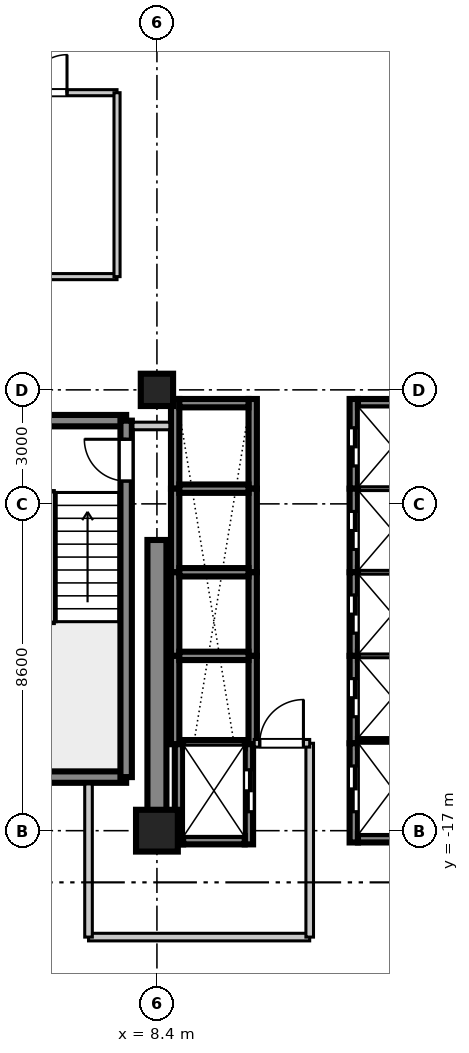
"""IFC4 building model, lengths in metres.
Left out: names, types, materials, properties, quantities, classifications, styles, units other than length and angle.
Written with IfcOpenShell. Run it as: python <this file> out.ifc"""

import sys

from ifc_helpers import new_model, si_unit, direction, frame, frame_2d, origin, origin_2d, place, context, subcontext, project, spatial, rectangle, extrude, source, transform, mapped, element, fill, save


model = new_model("IFC4")
c1 = context("Model", 3, precision=1e-05, world=origin(), true_north=direction((0.0, 1.0)))
c2 = subcontext(c1, "Body", "Model", "MODEL_VIEW")
j1 = project(units=[si_unit("LENGTHUNIT", "METRE"), si_unit("PLANEANGLEUNIT", "RADIAN")], contexts=[c1])
p1 = place(None, origin())
s1 = spatial("IfcSite", under=j1, at=p1, CompositionType="ELEMENT")
p2 = place(p1, origin())
s2 = spatial("IfcBuilding", under=s1, at=p2, CompositionType="ELEMENT")
p3 = place(p2, frame((0.0, 0.0, 156.3)))
s3 = spatial("IfcBuildingStorey", under=s2, at=p3, CompositionType="ELEMENT", Elevation=156.3)
m1 = source(origin(), c2, "Body", "SweptSolid", [
    extrude(rectangle(XDim=1.1, YDim=1.1, at=origin_2d()), origin(), (0.0, 0.0, 1.0), 3.605),
])
p4 = place(p3, frame((8.4, -17.0, 0.0), z_axis=(0.0, 0.0, 1.0), x_axis=(1.0, 0.0, 0.0)))
e1 = element("IfcColumn", 1, at=p4, inside=s3, PredefinedType="COLUMN", context=c2, shape_type="MappedRepresentation", body=[
    mapped(m1, transform((0.0, 0.0, 0.0), scale=1.0)),
])
m2 = source(origin(), c2, "Body", "SweptSolid", [
    extrude(rectangle(XDim=0.85, YDim=0.85, at=origin_2d()), origin(), (0.0, 0.0, 1.0), 3.605),
])
p5 = place(p3, frame((8.4, -5.4, 0.0), z_axis=(0.0, 0.0, 1.0), x_axis=(1.0, 0.0, 0.0)))
e2 = element("IfcColumn", 2, at=p5, inside=s3, PredefinedType="PILASTER", context=c2, shape_type="MappedRepresentation", body=[
    mapped(m2, transform((0.0, 0.0, 0.0), scale=1.0)),
])
m3 = source(origin(), c2, "Body", "SweptSolid", [
    extrude(rectangle(XDim=7.65, YDim=0.5, at=frame_2d((3.825, 0.0))), origin(), (0.0, 0.0, 1.0), 3.39),
])
p6 = place(p3, frame((8.4, -17.0, 0.0), z_axis=(0.0, 0.0, 1.0), x_axis=(0.0, 1.0, 0.0)))
e3 = element("IfcWall", 3, at=p6, inside=s3, PredefinedType="SHEAR", context=c2, shape_type="MappedRepresentation", body=[
    mapped(m3, transform((0.0, 0.0, 0.0), scale=1.0)),
])
m4 = source(origin(), c2, "Body", "SweptSolid", [
    extrude(rectangle(XDim=3.98, YDim=0.3, at=frame_2d((1.99, 0.0))), origin(), (0.0, 0.0, 1.0), 3.39),
])
for number, where, z_axis, x_axis in (
    (4, (3.61, -15.59, 0.0), (0.0, 0.0, 1.0), (1.0, 0.0, 0.0)),
    (5, (3.61, -6.21, 0.0), (0.0, 0.0, 1.0), (1.0, 0.0, 0.0)),
):
    element("IfcWall", number, at=place(p3, frame(where, z_axis=z_axis, x_axis=x_axis)), inside=s3, PredefinedType="SHEAR", context=c2, shape_type="MappedRepresentation", body=[
        mapped(m4, transform((0.0, 0.0, 0.0), scale=1.0)),
    ])
m5 = source(origin(), c2, "Body", "SweptSolid", [
    extrude(rectangle(XDim=9.38, YDim=0.3, at=frame_2d((4.69, 0.0))), origin(), (0.0, 0.0, 1.0), 3.39),
])
p7 = place(p3, frame((7.59, -15.59, 0.0), z_axis=(0.0, 0.0, 1.0), x_axis=(0.0, 1.0, 0.0)))
e6 = element("IfcWall", 6, at=p7, inside=s3, PredefinedType="SHEAR", context=c2, shape_type="MappedRepresentation", body=[
    mapped(m5, transform((0.0, 0.0, 0.0), scale=1.0)),
])
p8 = place(p7, frame((7.79, 0.0, 0.0)))
e7 = element("IfcOpeningElement", 7, at=p8, cuts=e6, PredefinedType="OPENING", context=c2, shape_type="SweptSolid", body=[
    extrude(rectangle(XDim=1.1, YDim=2.15, at=frame_2d((0.55, 1.075))), frame((0.0, 0.16, 0.0), z_axis=(0.0, -1.0, 0.0), x_axis=(1.0, 0.0, 0.0)), (0.0, 0.0, 1.0), 0.32),
])
m6 = source(origin(), c2, "Body", "SweptSolid", [
    extrude(rectangle(XDim=2.36, YDim=0.22, at=frame_2d((1.18, 0.0))), origin(), (0.0, 0.0, 1.0), 3.39),
])
p9 = place(p3, frame((13.58, -8.0, 0.0), z_axis=(0.0, 0.0, 1.0), x_axis=(0.0, 1.0, 0.0)))
e8 = element("IfcWall", 8, at=p9, inside=s3, PredefinedType="SHEAR", context=c2, shape_type="MappedRepresentation", body=[
    mapped(m6, transform((0.0, 0.0, 0.0), scale=1.0)),
])
p10 = place(p9, frame((0.6, 0.0, 0.0)))
e9 = element("IfcOpeningElement", 9, at=p10, cuts=e8, PredefinedType="OPENING", context=c2, shape_type="SweptSolid", body=[
    extrude(rectangle(XDim=1.0, YDim=2.2, at=frame_2d((0.5, 1.1))), frame((0.0, 0.12, 0.0), z_axis=(0.0, -1.0, 0.0), x_axis=(1.0, 0.0, 0.0)), (0.0, 0.0, 1.0), 0.24),
])
m7 = source(origin(), c2, "Body", "SweptSolid", [
    extrude(rectangle(XDim=1.82, YDim=0.22, at=frame_2d((0.91, 0.0))), origin(), (0.0, 0.0, 1.0), 3.39),
])
p11 = place(p3, frame((13.69, -5.75, 0.0), z_axis=(0.0, 0.0, 1.0), x_axis=(1.0, 0.0, 0.0)))
e10 = element("IfcWall", 10, at=p11, inside=s3, PredefinedType="SHEAR", context=c2, shape_type="MappedRepresentation", body=[
    mapped(m7, transform((0.0, 0.0, 0.0), scale=1.0)),
])
m8 = source(origin(), c2, "Body", "SweptSolid", [
    extrude(rectangle(XDim=2.2, YDim=0.22, at=frame_2d((1.1, 0.0))), origin(), (0.0, 0.0, 1.0), 3.39),
])
p12 = place(p3, frame((13.58, -10.2, 0.0), z_axis=(0.0, 0.0, 1.0), x_axis=(0.0, 1.0, 0.0)))
e11 = element("IfcWall", 11, at=p12, inside=s3, PredefinedType="SHEAR", context=c2, shape_type="MappedRepresentation", body=[
    mapped(m8, transform((0.0, 0.0, 0.0), scale=1.0)),
])
p13 = place(p12, frame((0.6, 0.0, 0.0)))
e12 = element("IfcOpeningElement", 12, at=p13, cuts=e11, PredefinedType="OPENING", context=c2, shape_type="SweptSolid", body=[
    extrude(rectangle(XDim=1.0, YDim=2.2, at=frame_2d((0.5, 1.1))), frame((0.0, 0.12, 0.0), z_axis=(0.0, -1.0, 0.0), x_axis=(1.0, 0.0, 0.0)), (0.0, 0.0, 1.0), 0.24),
])
m9 = source(origin(), c2, "Body", "SweptSolid", [
    extrude(rectangle(XDim=1.82, YDim=0.22, at=frame_2d((0.91, 0.0))), origin(), (0.0, 0.0, 1.0), 3.65),
])
p14 = place(p3, frame((13.69, -8.0, 0.0), z_axis=(0.0, 0.0, 1.0), x_axis=(1.0, 0.0, 0.0)))
e13 = element("IfcWall", 13, at=p14, inside=s3, PredefinedType="SHEAR", context=c2, shape_type="MappedRepresentation", body=[
    mapped(m9, transform((0.0, 0.0, 0.0), scale=1.0)),
])
p15 = place(p3, frame((13.58, -12.4, 0.0), z_axis=(0.0, 0.0, 1.0), x_axis=(0.0, 1.0, 0.0)))
e14 = element("IfcWall", 14, at=p15, inside=s3, PredefinedType="SHEAR", context=c2, shape_type="MappedRepresentation", body=[
    mapped(m8, transform((0.0, 0.0, 0.0), scale=1.0)),
])
p16 = place(p15, frame((0.6, 0.0, 0.0)))
e15 = element("IfcOpeningElement", 15, at=p16, cuts=e14, PredefinedType="OPENING", context=c2, shape_type="SweptSolid", body=[
    extrude(rectangle(XDim=1.0, YDim=2.2, at=frame_2d((0.5, 1.1))), frame((0.0, 0.12, 0.0), z_axis=(0.0, -1.0, 0.0), x_axis=(1.0, 0.0, 0.0)), (0.0, 0.0, 1.0), 0.24),
])
p17 = place(p3, frame((13.69, -10.2, 0.0), z_axis=(0.0, 0.0, 1.0), x_axis=(1.0, 0.0, 0.0)))
e16 = element("IfcWall", 16, at=p17, inside=s3, PredefinedType="SHEAR", context=c2, shape_type="MappedRepresentation", body=[
    mapped(m9, transform((0.0, 0.0, 0.0), scale=1.0)),
])
m10 = source(origin(), c2, "Body", "SweptSolid", [
    extrude(rectangle(XDim=2.3, YDim=0.22, at=frame_2d((1.15, 0.0))), origin(), (0.0, 0.0, 1.0), 3.39),
])
p18 = place(p3, frame((13.58, -14.7, 0.0), z_axis=(0.0, 0.0, 1.0), x_axis=(0.0, 1.0, 0.0)))
e17 = element("IfcWall", 17, at=p18, inside=s3, PredefinedType="SHEAR", context=c2, shape_type="MappedRepresentation", body=[
    mapped(m10, transform((0.0, 0.0, 0.0), scale=1.0)),
])
p19 = place(p18, frame((0.7, 0.0, 0.0)))
e18 = element("IfcOpeningElement", 18, at=p19, cuts=e17, PredefinedType="OPENING", context=c2, shape_type="SweptSolid", body=[
    extrude(rectangle(XDim=1.0, YDim=2.2, at=frame_2d((0.5, 1.1))), frame((0.0, 0.12, 0.0), z_axis=(0.0, -1.0, 0.0), x_axis=(1.0, 0.0, 0.0)), (0.0, 0.0, 1.0), 0.24),
])
p20 = place(p3, frame((13.69, -12.4, 0.0), z_axis=(0.0, 0.0, 1.0), x_axis=(1.0, 0.0, 0.0)))
e19 = element("IfcWall", 19, at=p20, inside=s3, PredefinedType="SHEAR", context=c2, shape_type="MappedRepresentation", body=[
    mapped(m9, transform((0.0, 0.0, 0.0), scale=1.0)),
])
for number, where, z_axis, x_axis in (
    (20, (8.88, -8.0, 0.0), (0.0, 0.0, 1.0), (0.0, 1.0, 0.0)),
    (21, (10.92, -8.0, 0.0), (0.0, 0.0, 1.0), (0.0, 1.0, 0.0)),
):
    element("IfcWall", number, at=place(p3, frame(where, z_axis=z_axis, x_axis=x_axis)), inside=s3, PredefinedType="SHEAR", context=c2, shape_type="MappedRepresentation", body=[
        mapped(m6, transform((0.0, 0.0, 0.0), scale=1.0)),
    ])
p21 = place(p3, frame((8.99, -5.75, 0.0), z_axis=(0.0, 0.0, 1.0), x_axis=(1.0, 0.0, 0.0)))
e22 = element("IfcWall", 22, at=p21, inside=s3, PredefinedType="SHEAR", context=c2, shape_type="MappedRepresentation", body=[
    mapped(m7, transform((0.0, 0.0, 0.0), scale=1.0)),
])
for number, where, z_axis, x_axis in (
    (23, (8.88, -10.2, 0.0), (0.0, 0.0, 1.0), (0.0, 1.0, 0.0)),
    (24, (10.92, -10.2, 0.0), (0.0, 0.0, 1.0), (0.0, 1.0, 0.0)),
):
    element("IfcWall", number, at=place(p3, frame(where, z_axis=z_axis, x_axis=x_axis)), inside=s3, PredefinedType="SHEAR", context=c2, shape_type="MappedRepresentation", body=[
        mapped(m8, transform((0.0, 0.0, 0.0), scale=1.0)),
    ])
p22 = place(p3, frame((8.99, -8.0, 0.0), z_axis=(0.0, 0.0, 1.0), x_axis=(1.0, 0.0, 0.0)))
e25 = element("IfcWall", 25, at=p22, inside=s3, PredefinedType="SHEAR", context=c2, shape_type="MappedRepresentation", body=[
    mapped(m9, transform((0.0, 0.0, 0.0), scale=1.0)),
])
for number, where, z_axis, x_axis in (
    (26, (8.88, -12.4, 0.0), (0.0, 0.0, 1.0), (0.0, 1.0, 0.0)),
    (27, (10.92, -12.4, 0.0), (0.0, 0.0, 1.0), (0.0, 1.0, 0.0)),
):
    element("IfcWall", number, at=place(p3, frame(where, z_axis=z_axis, x_axis=x_axis)), inside=s3, PredefinedType="SHEAR", context=c2, shape_type="MappedRepresentation", body=[
        mapped(m8, transform((0.0, 0.0, 0.0), scale=1.0)),
    ])
p23 = place(p3, frame((8.99, -10.2, 0.0), z_axis=(0.0, 0.0, 1.0), x_axis=(1.0, 0.0, 0.0)))
e28 = element("IfcWall", 28, at=p23, inside=s3, PredefinedType="SHEAR", context=c2, shape_type="MappedRepresentation", body=[
    mapped(m9, transform((0.0, 0.0, 0.0), scale=1.0)),
])
m11 = source(origin(), c2, "Body", "SweptSolid", [
    extrude(rectangle(XDim=2.325, YDim=0.22, at=frame_2d((1.163, 0.0))), origin(), (0.0, 0.0, 1.0), 3.39),
])
for number, where, z_axis, x_axis in (
    (29, (8.88, -14.725, 0.0), (0.0, 0.0, 1.0), (0.0, 1.0, 0.0)),
    (30, (10.92, -14.725, 0.0), (0.0, 0.0, 1.0), (0.0, 1.0, 0.0)),
):
    element("IfcWall", number, at=place(p3, frame(where, z_axis=z_axis, x_axis=x_axis)), inside=s3, PredefinedType="SHEAR", context=c2, shape_type="MappedRepresentation", body=[
        mapped(m11, transform((0.0, 0.0, 0.0), scale=1.0)),
    ])
p24 = place(p3, frame((8.99, -12.4, 0.0), z_axis=(0.0, 0.0, 1.0), x_axis=(1.0, 0.0, 0.0)))
e31 = element("IfcWall", 31, at=p24, inside=s3, PredefinedType="SHEAR", context=c2, shape_type="MappedRepresentation", body=[
    mapped(m9, transform((0.0, 0.0, 0.0), scale=1.0)),
])
m12 = source(origin(), c2, "Body", "SweptSolid", [
    extrude(rectangle(XDim=2.635, YDim=0.22, at=frame_2d((1.317, 0.0))), origin(), (0.0, 0.0, 1.0), 3.39),
])
p25 = place(p3, frame((8.98, -17.36, 0.0), z_axis=(0.0, 0.0, 1.0), x_axis=(0.0, 1.0, 0.0)))
e32 = element("IfcWall", 32, at=p25, inside=s3, PredefinedType="SHEAR", context=c2, shape_type="MappedRepresentation", body=[
    mapped(m12, transform((0.0, 0.0, 0.0), scale=1.0)),
])
p26 = place(p3, frame((10.82, -17.36, 0.0), z_axis=(0.0, 0.0, 1.0), x_axis=(0.0, 1.0, 0.0)))
e33 = element("IfcWall", 33, at=p26, inside=s3, PredefinedType="SHEAR", context=c2, shape_type="MappedRepresentation", body=[
    mapped(m12, transform((0.0, 0.0, 0.0), scale=1.0)),
])
p27 = place(p26, frame((0.86, 0.0, 0.0)))
e34 = element("IfcOpeningElement", 34, at=p27, cuts=e33, PredefinedType="OPENING", context=c2, shape_type="SweptSolid", body=[
    extrude(rectangle(XDim=1.1, YDim=2.2, at=frame_2d((0.55, 1.1))), frame((0.0, 0.12, 0.0), z_axis=(0.0, -1.0, 0.0), x_axis=(1.0, 0.0, 0.0)), (0.0, 0.0, 1.0), 0.24),
])
m13 = source(origin(), c2, "Body", "SweptSolid", [
    extrude(rectangle(XDim=1.62, YDim=0.22, at=frame_2d((0.81, 0.0))), origin(), (0.0, 0.0, 1.0), 3.39),
])
p28 = place(p3, frame((9.09, -17.25, 0.0), z_axis=(0.0, 0.0, 1.0), x_axis=(1.0, 0.0, 0.0)))
e35 = element("IfcWall", 35, at=p28, inside=s3, PredefinedType="SHEAR", context=c2, shape_type="MappedRepresentation", body=[
    mapped(m13, transform((0.0, 0.0, 0.0), scale=1.0)),
])
m14 = source(origin(), c2, "Body", "SweptSolid", [
    extrude(rectangle(XDim=1.62, YDim=0.22, at=frame_2d((0.81, 0.0))), origin(), (0.0, 0.0, 1.0), 3.65),
])
p29 = place(p3, frame((9.09, -14.725, 0.0), z_axis=(0.0, 0.0, 1.0), x_axis=(1.0, 0.0, 0.0)))
e36 = element("IfcWall", 36, at=p29, inside=s3, PredefinedType="SHEAR", context=c2, shape_type="MappedRepresentation", body=[
    mapped(m14, transform((0.0, 0.0, 0.0), scale=1.0)),
])
m15 = source(origin(), c2, "Body", "SweptSolid", [
    extrude(rectangle(XDim=2.61, YDim=0.22, at=frame_2d((1.305, 0.0))), origin(), (0.0, 0.0, 1.0), 3.39),
])
p30 = place(p3, frame((13.58, -17.31, 0.0), z_axis=(0.0, 0.0, 1.0), x_axis=(0.0, 1.0, 0.0)))
e37 = element("IfcWall", 37, at=p30, inside=s3, PredefinedType="SHEAR", context=c2, shape_type="MappedRepresentation", body=[
    mapped(m15, transform((0.0, 0.0, 0.0), scale=1.0)),
])
p31 = place(p30, frame((0.81, 0.0, 0.0)))
e38 = element("IfcOpeningElement", 38, at=p31, cuts=e37, PredefinedType="OPENING", context=c2, shape_type="SweptSolid", body=[
    extrude(rectangle(XDim=1.2, YDim=2.2, at=frame_2d((0.6, 1.1))), frame((0.0, 0.12, 0.0), z_axis=(0.0, -1.0, 0.0), x_axis=(1.0, 0.0, 0.0)), (0.0, 0.0, 1.0), 0.24),
])
p32 = place(p3, frame((13.69, -17.2, 0.0), z_axis=(0.0, 0.0, 1.0), x_axis=(1.0, 0.0, 0.0)))
e39 = element("IfcWall", 39, at=p32, inside=s3, PredefinedType="SHEAR", context=c2, shape_type="MappedRepresentation", body=[
    mapped(m7, transform((0.0, 0.0, 0.0), scale=1.0)),
])
p33 = place(p3, frame((13.69, -14.7, 0.0), z_axis=(0.0, 0.0, 1.0), x_axis=(1.0, 0.0, 0.0)))
e40 = element("IfcWall", 40, at=p33, inside=s3, PredefinedType="SHEAR", context=c2, shape_type="MappedRepresentation", body=[
    mapped(m9, transform((0.0, 0.0, 0.0), scale=1.0)),
])
m16 = source(origin(), c2, "Body", "SweptSolid", [
    extrude(rectangle(XDim=5.82, YDim=0.2, at=frame_2d((2.91, 0.0))), origin(), (0.0, 0.0, 1.0), 2.73),
])
p34 = place(p3, frame((6.6, -19.8, 0.0), z_axis=(0.0, 0.0, 1.0), x_axis=(1.0, 0.0, 0.0)))
e41 = element("IfcWall", 41, at=p34, inside=s3, PredefinedType="PARTITIONING", context=c2, shape_type="MappedRepresentation", body=[
    mapped(m16, transform((0.0, 0.0, 0.0), scale=1.0)),
])
m17 = source(origin(), c2, "Body", "SweptSolid", [
    extrude(rectangle(XDim=4.03, YDim=0.2, at=frame_2d((2.015, 0.0))), origin(), (0.0, 0.0, 1.0), 2.73),
])
p35 = place(p3, frame((6.6, -19.8, 0.0), z_axis=(0.0, 0.0, 1.0), x_axis=(0.0, 1.0, 0.0)))
e42 = element("IfcWall", 42, at=p35, inside=s3, PredefinedType="PARTITIONING", context=c2, shape_type="MappedRepresentation", body=[
    mapped(m17, transform((0.0, 0.0, 0.0), scale=1.0)),
])
m18 = source(origin(), c2, "Body", "SweptSolid", [
    extrude(rectangle(XDim=5.1, YDim=0.2, at=frame_2d((2.55, 0.0))), origin(), (0.0, 0.0, 1.0), 2.73),
])
p36 = place(p3, frame((12.42, -19.8, 0.0), z_axis=(0.0, 0.0, 1.0), x_axis=(0.0, 1.0, 0.0)))
e43 = element("IfcWall", 43, at=p36, inside=s3, PredefinedType="PARTITIONING", context=c2, shape_type="MappedRepresentation", body=[
    mapped(m18, transform((0.0, 0.0, 0.0), scale=1.0)),
])
m19 = source(origin(), c2, "Body", "SweptSolid", [
    extrude(rectangle(XDim=1.46, YDim=0.2, at=frame_2d((0.73, 0.0))), origin(), (0.0, 0.0, 1.0), 2.73),
])
p37 = place(p3, frame((10.96, -14.7, 0.0), z_axis=(0.0, 0.0, 1.0), x_axis=(1.0, 0.0, 0.0)))
e44 = element("IfcWall", 44, at=p37, inside=s3, PredefinedType="PARTITIONING", context=c2, shape_type="MappedRepresentation", body=[
    mapped(m19, transform((0.0, 0.0, 0.0), scale=1.0)),
])
p38 = place(p37, frame((0.145, 0.0, 0.0)))
e45 = element("IfcOpeningElement", 45, at=p38, cuts=e44, PredefinedType="OPENING", context=c2, shape_type="SweptSolid", body=[
    extrude(rectangle(XDim=1.15, YDim=2.15, at=frame_2d((0.575, 1.075))), frame((0.0, 0.11, 0.0), z_axis=(0.0, -1.0, 0.0), x_axis=(1.0, 0.0, 0.0)), (0.0, 0.0, 1.0), 0.22),
])
m20 = source(origin(), c2, "Body", "SweptSolid", [
    extrude(rectangle(XDim=0.97, YDim=0.2, at=frame_2d((0.485, 0.0))), origin(), (0.0, 0.0, 1.0), 2.73),
])
p39 = place(p3, frame((7.77, -6.35, 0.0), z_axis=(0.0, 0.0, 1.0), x_axis=(1.0, 0.0, 0.0)))
e46 = element("IfcWall", 46, at=p39, inside=s3, PredefinedType="PARTITIONING", context=c2, shape_type="MappedRepresentation", body=[
    mapped(m20, transform((0.0, 0.0, 0.0), scale=1.0)),
])
m21 = source(origin(), c2, "Body", "SweptSolid", [
    extrude(rectangle(XDim=5.676, YDim=0.16, at=frame_2d((2.838, 0.0))), origin(), (0.0, 0.0, 1.0), 2.73),
])
p40 = place(p3, frame((1.674, -2.42, 0.0), z_axis=(0.0, 0.0, 1.0), x_axis=(1.0, 0.0, 0.0)))
e47 = element("IfcWall", 47, at=p40, inside=s3, PredefinedType="PARTITIONING", context=c2, shape_type="MappedRepresentation", body=[
    mapped(m21, transform((0.0, 0.0, 0.0), scale=1.0)),
])
p41 = place(p3, frame((1.674, 2.42, 0.0), z_axis=(0.0, 0.0, 1.0), x_axis=(1.0, 0.0, 0.0)))
e48 = element("IfcWall", 48, at=p41, inside=s3, PredefinedType="PARTITIONING", context=c2, shape_type="MappedRepresentation", body=[
    mapped(m21, transform((0.0, 0.0, 0.0), scale=1.0)),
])
p42 = place(p41, frame((3.36, 0.0, 0.0)))
e49 = element("IfcOpeningElement", 49, at=p42, cuts=e48, PredefinedType="OPENING", context=c2, shape_type="SweptSolid", body=[
    extrude(rectangle(XDim=1.0, YDim=2.1, at=frame_2d((0.5, 1.05))), frame((0.0, 0.09, 0.0), z_axis=(0.0, -1.0, 0.0), x_axis=(1.0, 0.0, 0.0)), (0.0, 0.0, 1.0), 0.18),
])
m22 = source(origin(), c2, "Body", "SweptSolid", [
    extrude(rectangle(XDim=4.84, YDim=0.16, at=frame_2d((2.42, 0.0))), origin(), (0.0, 0.0, 1.0), 2.73),
])
p43 = place(p3, frame((7.35, -2.42, 0.0), z_axis=(0.0, 0.0, 1.0), x_axis=(0.0, 1.0, 0.0)))
e50 = element("IfcWall", 50, at=p43, inside=s3, PredefinedType="PARTITIONING", context=c2, shape_type="MappedRepresentation", body=[
    mapped(m22, transform((0.0, 0.0, 0.0), scale=1.0)),
])
m23 = source(origin(), c2, "Body", "SweptSolid", [
    extrude(rectangle(XDim=1.1, YDim=2.15, at=frame_2d((0.55, 1.075))), frame((0.0, 0.025, 0.0), z_axis=(0.0, -1.0, 0.0), x_axis=(1.0, 0.0, 0.0)), (0.0, 0.0, 1.0), 0.05),
])
p44 = place(p8, origin())
e51 = element("IfcDoor", 51, at=p44, inside=s3, OperationType="SINGLE_SWING_RIGHT", PredefinedType="DOOR", context=c2, shape_type="MappedRepresentation", body=[
    mapped(m23, transform((0.0, 0.0, 0.0), scale=1.0)),
])
fill(e7, e51)
m24 = source(origin(), c2, "Body", "SweptSolid", [
    extrude(rectangle(XDim=1.0, YDim=2.2, at=frame_2d((0.5, 1.1))), frame((0.0, 0.025, 0.0), z_axis=(0.0, -1.0, 0.0), x_axis=(1.0, 0.0, 0.0)), (0.0, 0.0, 1.0), 0.05),
])
p45 = place(p10, origin())
e52 = element("IfcDoor", 52, at=p45, inside=s3, OperationType="DOUBLE_DOOR_SLIDING", PredefinedType="DOOR", context=c2, shape_type="MappedRepresentation", body=[
    mapped(m24, transform((0.0, 0.0, 0.0), scale=1.0)),
])
fill(e9, e52)
p46 = place(p13, origin())
e53 = element("IfcDoor", 53, at=p46, inside=s3, OperationType="DOUBLE_DOOR_SLIDING", PredefinedType="DOOR", context=c2, shape_type="MappedRepresentation", body=[
    mapped(m24, transform((0.0, 0.0, 0.0), scale=1.0)),
])
fill(e12, e53)
p47 = place(p16, origin())
e54 = element("IfcDoor", 54, at=p47, inside=s3, OperationType="DOUBLE_DOOR_SLIDING", PredefinedType="DOOR", context=c2, shape_type="MappedRepresentation", body=[
    mapped(m24, transform((0.0, 0.0, 0.0), scale=1.0)),
])
fill(e15, e54)
p48 = place(p19, origin())
e55 = element("IfcDoor", 55, at=p48, inside=s3, OperationType="DOUBLE_DOOR_SLIDING", PredefinedType="DOOR", context=c2, shape_type="MappedRepresentation", body=[
    mapped(m24, transform((0.0, 0.0, 0.0), scale=1.0)),
])
fill(e18, e55)
m25 = source(origin(), c2, "Body", "SweptSolid", [
    extrude(rectangle(XDim=1.1, YDim=2.2, at=frame_2d((0.55, 1.1))), frame((0.0, 0.025, 0.0), z_axis=(0.0, -1.0, 0.0), x_axis=(1.0, 0.0, 0.0)), (0.0, 0.0, 1.0), 0.05),
])
p49 = place(p27, frame((1.1, 0.0, 0.0), z_axis=(0.0, 0.0, 1.0), x_axis=(-1.0, 0.0, 0.0)))
e56 = element("IfcDoor", 56, at=p49, inside=s3, OperationType="DOUBLE_DOOR_SLIDING", PredefinedType="DOOR", context=c2, shape_type="MappedRepresentation", body=[
    mapped(m25, transform((0.0, 0.0, 0.0), scale=1.0)),
])
fill(e34, e56)
m26 = source(origin(), c2, "Body", "SweptSolid", [
    extrude(rectangle(XDim=1.2, YDim=2.2, at=frame_2d((0.6, 1.1))), frame((0.0, 0.025, 0.0), z_axis=(0.0, -1.0, 0.0), x_axis=(1.0, 0.0, 0.0)), (0.0, 0.0, 1.0), 0.05),
])
p50 = place(p31, origin())
e57 = element("IfcDoor", 57, at=p50, inside=s3, OperationType="DOUBLE_DOOR_SLIDING", PredefinedType="DOOR", context=c2, shape_type="MappedRepresentation", body=[
    mapped(m26, transform((0.0, 0.0, 0.0), scale=1.0)),
])
fill(e38, e57)
m27 = source(origin(), c2, "Body", "SweptSolid", [
    extrude(rectangle(XDim=1.15, YDim=2.15, at=frame_2d((0.575, 1.075))), frame((0.0, 0.025, 0.0), z_axis=(0.0, -1.0, 0.0), x_axis=(1.0, 0.0, 0.0)), (0.0, 0.0, 1.0), 0.05),
])
p51 = place(p38, origin())
e58 = element("IfcDoor", 58, at=p51, inside=s3, OperationType="SINGLE_SWING_RIGHT", PredefinedType="DOOR", context=c2, shape_type="MappedRepresentation", body=[
    mapped(m27, transform((0.0, 0.0, 0.0), scale=1.0)),
])
fill(e45, e58)
m28 = source(origin(), c2, "Body", "SweptSolid", [
    extrude(rectangle(XDim=1.0, YDim=2.1, at=frame_2d((0.5, 1.05))), frame((0.0, 0.025, 0.0), z_axis=(0.0, -1.0, 0.0), x_axis=(1.0, 0.0, 0.0)), (0.0, 0.0, 1.0), 0.05),
])
p52 = place(p42, frame((1.0, 0.0, 0.0), z_axis=(0.0, 0.0, 1.0), x_axis=(-1.0, 0.0, 0.0)))
e59 = element("IfcDoor", 59, at=p52, inside=s3, OperationType="SINGLE_SWING_RIGHT", PredefinedType="DOOR", context=c2, shape_type="MappedRepresentation", body=[
    mapped(m28, transform((0.0, 0.0, 0.0), scale=1.0)),
])
fill(e49, e59)
save(model, sys.argv[1])
